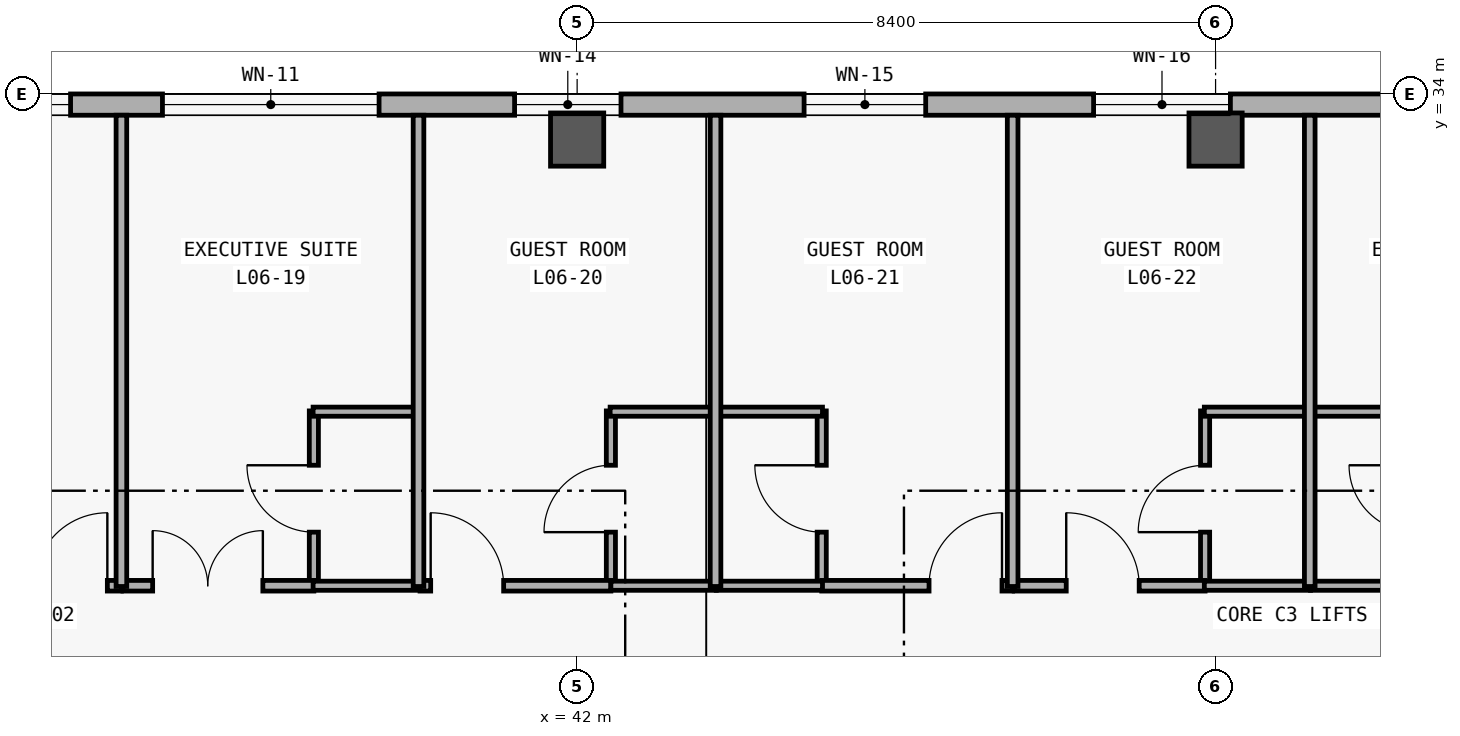
"""IFC4 building model, lengths in metres.
Left out: names, types, materials, properties, quantities, classifications, styles, units other than length and angle.
Written with IfcOpenShell. Run it as: python <this file> out.ifc"""

import sys

from ifc_helpers import new_model, si_unit, direction, frame, frame_2d, origin, origin_2d, place, context, subcontext, project, spatial, rectangle, extrude, element, fill, save


model = new_model("IFC4")
c1 = context("Model", 3, precision=1e-05, world=origin(), true_north=direction((0.0, 1.0)))
c2 = subcontext(c1, "Body", "Model", "MODEL_VIEW")
j1 = project(units=[si_unit("LENGTHUNIT", "METRE"), si_unit("PLANEANGLEUNIT", "RADIAN")], contexts=[c1])
p1 = place(None, origin())
s1 = spatial("IfcSite", under=j1, at=p1, CompositionType="ELEMENT")
p2 = place(p1, origin())
s2 = spatial("IfcBuilding", under=s1, at=p2, CompositionType="ELEMENT")
p3 = place(p2, frame((0.0, 0.0, 26.4)))
s3 = spatial("IfcBuildingStorey", under=s2, at=p3, CompositionType="ELEMENT", Elevation=26.4)
for number, where, z_axis, x_axis in (
    (1, (42.0, 33.4, 0.0), (0.0, 0.0, 1.0), (1.0, 0.0, 0.0)),
    (2, (50.4, 33.4, 0.0), (0.0, 0.0, 1.0), (1.0, 0.0, 0.0)),
):
    element("IfcColumn", number, at=place(p3, frame(where, z_axis=z_axis, x_axis=x_axis)), inside=s3, PredefinedType="COLUMN", context=c2, shape_type="SweptSolid", body=[
        extrude(rectangle(XDim=0.7, YDim=0.7, at=origin_2d()), origin(), (0.0, 0.0, 1.0), 3.6),
    ])
p4 = place(p3, frame((8.68, 33.86, 0.0), z_axis=(0.0, 0.0, 1.0), x_axis=(1.0, 0.0, 0.0)))
e3 = element("IfcWall", 3, at=p4, inside=s3, PredefinedType="SOLIDWALL", context=c2, shape_type="SweptSolid", body=[
    extrude(rectangle(XDim=66.64, YDim=0.28, at=frame_2d((33.32, 0.0))), origin(), (0.0, 0.0, 1.0), 3.32),
])
p5 = place(p4, frame((4.68, 0.0, 0.85)))
e4 = element("IfcOpeningElement", 4, at=p5, cuts=e3, PredefinedType="OPENING", context=c2, shape_type="SweptSolid", body=[
    extrude(rectangle(XDim=2.48, YDim=2.0, at=frame_2d((1.24, 1.0))), frame((0.0, 0.15, 0.0), z_axis=(0.0, -1.0, 0.0), x_axis=(1.0, 0.0, 0.0)), (0.0, 0.0, 1.0), 0.3),
])
p6 = place(p4, frame((12.829, 0.0, 0.85)))
e5 = element("IfcOpeningElement", 5, at=p6, cuts=e3, PredefinedType="OPENING", context=c2, shape_type="SweptSolid", body=[
    extrude(rectangle(XDim=1.65, YDim=1.75, at=frame_2d((0.825, 0.875))), frame((0.0, 0.15, 0.0), z_axis=(0.0, -1.0, 0.0), x_axis=(1.0, 0.0, 0.0)), (0.0, 0.0, 1.0), 0.3),
])
p7 = place(p4, frame((16.588, 0.0, 0.85)))
e6 = element("IfcOpeningElement", 6, at=p7, cuts=e3, PredefinedType="OPENING", context=c2, shape_type="SweptSolid", body=[
    extrude(rectangle(XDim=1.95, YDim=1.75, at=frame_2d((0.975, 0.875))), frame((0.0, 0.15, 0.0), z_axis=(0.0, -1.0, 0.0), x_axis=(1.0, 0.0, 0.0)), (0.0, 0.0, 1.0), 0.3),
])
p8 = place(p4, frame((20.347, 0.0, 0.85)))
e7 = element("IfcOpeningElement", 7, at=p8, cuts=e3, PredefinedType="OPENING", context=c2, shape_type="SweptSolid", body=[
    extrude(rectangle(XDim=2.25, YDim=1.75, at=frame_2d((1.125, 0.875))), frame((0.0, 0.15, 0.0), z_axis=(0.0, -1.0, 0.0), x_axis=(1.0, 0.0, 0.0)), (0.0, 0.0, 1.0), 0.3),
])
p9 = place(p4, frame((24.105, 0.0, 0.85)))
e8 = element("IfcOpeningElement", 8, at=p9, cuts=e3, PredefinedType="OPENING", context=c2, shape_type="SweptSolid", body=[
    extrude(rectangle(XDim=2.55, YDim=1.8, at=frame_2d((1.275, 0.9))), frame((0.0, 0.15, 0.0), z_axis=(0.0, -1.0, 0.0), x_axis=(1.0, 0.0, 0.0)), (0.0, 0.0, 1.0), 0.3),
])
p10 = place(p4, frame((27.864, 0.0, 0.85)))
e9 = element("IfcOpeningElement", 9, at=p10, cuts=e3, PredefinedType="OPENING", context=c2, shape_type="SweptSolid", body=[
    extrude(rectangle(XDim=2.85, YDim=1.85, at=frame_2d((1.425, 0.925))), frame((0.0, 0.15, 0.0), z_axis=(0.0, -1.0, 0.0), x_axis=(1.0, 0.0, 0.0)), (0.0, 0.0, 1.0), 0.3),
])
p11 = place(p4, frame((32.497, 0.0, 0.85)))
e10 = element("IfcOpeningElement", 10, at=p11, cuts=e3, PredefinedType="OPENING", context=c2, shape_type="SweptSolid", body=[
    extrude(rectangle(XDim=1.4, YDim=1.6, at=frame_2d((0.7, 0.8))), frame((0.0, 0.15, 0.0), z_axis=(0.0, -1.0, 0.0), x_axis=(1.0, 0.0, 0.0)), (0.0, 0.0, 1.0), 0.3),
])
p12 = place(p4, frame((36.306, 0.0, 0.85)))
e11 = element("IfcOpeningElement", 11, at=p12, cuts=e3, PredefinedType="OPENING", context=c2, shape_type="SweptSolid", body=[
    extrude(rectangle(XDim=1.6, YDim=1.6, at=frame_2d((0.8, 0.8))), frame((0.0, 0.15, 0.0), z_axis=(0.0, -1.0, 0.0), x_axis=(1.0, 0.0, 0.0)), (0.0, 0.0, 1.0), 0.3),
])
p13 = place(p4, frame((40.115, 0.0, 0.85)))
e12 = element("IfcOpeningElement", 12, at=p13, cuts=e3, PredefinedType="OPENING", context=c2, shape_type="SweptSolid", body=[
    extrude(rectangle(XDim=1.8, YDim=1.6, at=frame_2d((0.9, 0.8))), frame((0.0, 0.15, 0.0), z_axis=(0.0, -1.0, 0.0), x_axis=(1.0, 0.0, 0.0)), (0.0, 0.0, 1.0), 0.3),
])
p14 = place(p4, frame((43.923, 0.0, 0.85)))
e13 = element("IfcOpeningElement", 13, at=p14, cuts=e3, PredefinedType="OPENING", context=c2, shape_type="SweptSolid", body=[
    extrude(rectangle(XDim=2.0, YDim=1.65, at=frame_2d((1.0, 0.825))), frame((0.0, 0.15, 0.0), z_axis=(0.0, -1.0, 0.0), x_axis=(1.0, 0.0, 0.0)), (0.0, 0.0, 1.0), 0.3),
])
p15 = place(p4, frame((47.731, 0.0, 0.85)))
e14 = element("IfcOpeningElement", 14, at=p15, cuts=e3, PredefinedType="OPENING", context=c2, shape_type="SweptSolid", body=[
    extrude(rectangle(XDim=2.2, YDim=1.65, at=frame_2d((1.1, 0.825))), frame((0.0, 0.15, 0.0), z_axis=(0.0, -1.0, 0.0), x_axis=(1.0, 0.0, 0.0)), (0.0, 0.0, 1.0), 0.3),
])
p16 = place(p4, frame((51.44, 0.0, 0.85)))
e15 = element("IfcOpeningElement", 15, at=p16, cuts=e3, PredefinedType="OPENING", context=c2, shape_type="SweptSolid", body=[
    extrude(rectangle(XDim=2.6, YDim=2.2, at=frame_2d((1.3, 1.1))), frame((0.0, 0.15, 0.0), z_axis=(0.0, -1.0, 0.0), x_axis=(1.0, 0.0, 0.0)), (0.0, 0.0, 1.0), 0.3),
])
p17 = place(p4, frame((56.024, 0.0, 0.85)))
e16 = element("IfcOpeningElement", 16, at=p17, cuts=e3, PredefinedType="OPENING", context=c2, shape_type="SweptSolid", body=[
    extrude(rectangle(XDim=1.25, YDim=1.45, at=frame_2d((0.625, 0.725))), frame((0.0, 0.15, 0.0), z_axis=(0.0, -1.0, 0.0), x_axis=(1.0, 0.0, 0.0)), (0.0, 0.0, 1.0), 0.3),
])
p18 = place(p4, frame((59.882, 0.0, 0.85)))
e17 = element("IfcOpeningElement", 17, at=p18, cuts=e3, PredefinedType="OPENING", context=c2, shape_type="SweptSolid", body=[
    extrude(rectangle(XDim=1.35, YDim=1.55, at=frame_2d((0.675, 0.775))), frame((0.0, 0.15, 0.0), z_axis=(0.0, -1.0, 0.0), x_axis=(1.0, 0.0, 0.0)), (0.0, 0.0, 1.0), 0.3),
])
p19 = place(p4, frame((63.74, 0.0, 0.85)))
e18 = element("IfcOpeningElement", 18, at=p19, cuts=e3, PredefinedType="OPENING", context=c2, shape_type="SweptSolid", body=[
    extrude(rectangle(XDim=1.45, YDim=1.65, at=frame_2d((0.725, 0.825))), frame((0.0, 0.15, 0.0), z_axis=(0.0, -1.0, 0.0), x_axis=(1.0, 0.0, 0.0)), (0.0, 0.0, 1.0), 0.3),
])
p20 = place(p3, frame((38.536, 27.52, 0.0), z_axis=(0.0, 0.0, 1.0), x_axis=(0.0, 1.0, 0.0)))
e19 = element("IfcWall", 19, at=p20, inside=s3, PredefinedType="PARTITIONING", context=c2, shape_type="SweptSolid", body=[
    extrude(rectangle(XDim=2.31, YDim=0.12, at=frame_2d((1.155, 0.0))), origin(), (0.0, 0.0, 1.0), 2.48),
])
p21 = place(p20, frame((0.715, 0.0, 0.0)))
e20 = element("IfcOpeningElement", 20, at=p21, cuts=e19, PredefinedType="OPENING", context=c2, shape_type="SweptSolid", body=[
    extrude(rectangle(XDim=0.88, YDim=2.15, at=frame_2d((0.44, 1.075))), frame((0.0, 0.07, 0.0), z_axis=(0.0, -1.0, 0.0), x_axis=(1.0, 0.0, 0.0)), (0.0, 0.0, 1.0), 0.14),
])
p22 = place(p3, frame((42.444, 27.52, 0.0), z_axis=(0.0, 0.0, 1.0), x_axis=(0.0, 1.0, 0.0)))
e21 = element("IfcWall", 21, at=p22, inside=s3, PredefinedType="PARTITIONING", context=c2, shape_type="SweptSolid", body=[
    extrude(rectangle(XDim=2.31, YDim=0.12, at=frame_2d((1.155, 0.0))), origin(), (0.0, 0.0, 1.0), 2.48),
])
p23 = place(p22, frame((0.715, 0.0, 0.0)))
e22 = element("IfcOpeningElement", 22, at=p23, cuts=e21, PredefinedType="OPENING", context=c2, shape_type="SweptSolid", body=[
    extrude(rectangle(XDim=0.88, YDim=2.15, at=frame_2d((0.44, 1.075))), frame((0.0, 0.07, 0.0), z_axis=(0.0, -1.0, 0.0), x_axis=(1.0, 0.0, 0.0)), (0.0, 0.0, 1.0), 0.14),
])
p24 = place(p3, frame((45.218, 27.52, 0.0), z_axis=(0.0, 0.0, 1.0), x_axis=(0.0, 1.0, 0.0)))
e23 = element("IfcWall", 23, at=p24, inside=s3, PredefinedType="PARTITIONING", context=c2, shape_type="SweptSolid", body=[
    extrude(rectangle(XDim=2.31, YDim=0.12, at=frame_2d((1.155, 0.0))), origin(), (0.0, 0.0, 1.0), 2.48),
])
p25 = place(p24, frame((0.715, 0.0, 0.0)))
e24 = element("IfcOpeningElement", 24, at=p25, cuts=e23, PredefinedType="OPENING", context=c2, shape_type="SweptSolid", body=[
    extrude(rectangle(XDim=0.88, YDim=2.15, at=frame_2d((0.44, 1.075))), frame((0.0, 0.07, 0.0), z_axis=(0.0, -1.0, 0.0), x_axis=(1.0, 0.0, 0.0)), (0.0, 0.0, 1.0), 0.14),
])
p26 = place(p3, frame((50.262, 27.52, 0.0), z_axis=(0.0, 0.0, 1.0), x_axis=(0.0, 1.0, 0.0)))
e25 = element("IfcWall", 25, at=p26, inside=s3, PredefinedType="PARTITIONING", context=c2, shape_type="SweptSolid", body=[
    extrude(rectangle(XDim=2.31, YDim=0.12, at=frame_2d((1.155, 0.0))), origin(), (0.0, 0.0, 1.0), 2.48),
])
p27 = place(p26, frame((0.715, 0.0, 0.0)))
e26 = element("IfcOpeningElement", 26, at=p27, cuts=e25, PredefinedType="OPENING", context=c2, shape_type="SweptSolid", body=[
    extrude(rectangle(XDim=0.88, YDim=2.15, at=frame_2d((0.44, 1.075))), frame((0.0, 0.07, 0.0), z_axis=(0.0, -1.0, 0.0), x_axis=(1.0, 0.0, 0.0)), (0.0, 0.0, 1.0), 0.14),
])
p28 = place(p3, frame((33.493, 27.53, 0.0), z_axis=(0.0, 0.0, 1.0), x_axis=(1.0, 0.0, 0.0)))
e27 = element("IfcWall", 27, at=p28, inside=s3, PredefinedType="PARTITIONING", context=c2, shape_type="SweptSolid", body=[
    extrude(rectangle(XDim=2.511, YDim=0.14, at=frame_2d((1.255, 0.0))), origin(), (0.0, 0.0, 1.0), 2.48),
])
p29 = place(p28, frame((1.366, 0.0, 0.0)))
e28 = element("IfcOpeningElement", 28, at=p29, cuts=e27, PredefinedType="OPENING", context=c2, shape_type="SweptSolid", body=[
    extrude(rectangle(XDim=0.96, YDim=2.25, at=frame_2d((0.48, 1.125))), frame((0.0, 0.08, 0.0), z_axis=(0.0, -1.0, 0.0), x_axis=(1.0, 0.0, 0.0)), (0.0, 0.0, 1.0), 0.16),
])
p30 = place(p3, frame((36.024, 27.53, 0.0), z_axis=(0.0, 0.0, 1.0), x_axis=(1.0, 0.0, 0.0)))
e29 = element("IfcWall", 29, at=p30, inside=s3, PredefinedType="PARTITIONING", context=c2, shape_type="SweptSolid", body=[
    extrude(rectangle(XDim=2.512, YDim=0.14, at=frame_2d((1.256, 0.0))), origin(), (0.0, 0.0, 1.0), 2.48),
])
p31 = place(p30, frame((0.391, 0.0, 0.0)))
e30 = element("IfcOpeningElement", 30, at=p31, cuts=e29, PredefinedType="OPENING", context=c2, shape_type="SweptSolid", body=[
    extrude(rectangle(XDim=1.45, YDim=2.3, at=frame_2d((0.725, 1.15))), frame((0.0, 0.08, 0.0), z_axis=(0.0, -1.0, 0.0), x_axis=(1.0, 0.0, 0.0)), (0.0, 0.0, 1.0), 0.16),
])
p32 = place(p3, frame((39.933, 27.53, 0.0), z_axis=(0.0, 0.0, 1.0), x_axis=(1.0, 0.0, 0.0)))
e31 = element("IfcWall", 31, at=p32, inside=s3, PredefinedType="PARTITIONING", context=c2, shape_type="SweptSolid", body=[
    extrude(rectangle(XDim=2.511, YDim=0.14, at=frame_2d((1.255, 0.0))), origin(), (0.0, 0.0, 1.0), 2.48),
])
p33 = place(p32, frame((0.14, 0.0, 0.0)))
e32 = element("IfcOpeningElement", 32, at=p33, cuts=e31, PredefinedType="OPENING", context=c2, shape_type="SweptSolid", body=[
    extrude(rectangle(XDim=0.96, YDim=2.25, at=frame_2d((0.48, 1.125))), frame((0.0, 0.08, 0.0), z_axis=(0.0, -1.0, 0.0), x_axis=(1.0, 0.0, 0.0)), (0.0, 0.0, 1.0), 0.16),
])
p34 = place(p3, frame((45.218, 27.53, 0.0), z_axis=(0.0, 0.0, 1.0), x_axis=(1.0, 0.0, 0.0)))
e33 = element("IfcWall", 33, at=p34, inside=s3, PredefinedType="PARTITIONING", context=c2, shape_type="SweptSolid", body=[
    extrude(rectangle(XDim=2.512, YDim=0.14, at=frame_2d((1.256, 0.0))), origin(), (0.0, 0.0, 1.0), 2.48),
])
p35 = place(p34, frame((1.412, 0.0, 0.0)))
e34 = element("IfcOpeningElement", 34, at=p35, cuts=e33, PredefinedType="OPENING", context=c2, shape_type="SweptSolid", body=[
    extrude(rectangle(XDim=0.96, YDim=2.25, at=frame_2d((0.48, 1.125))), frame((0.0, 0.08, 0.0), z_axis=(0.0, -1.0, 0.0), x_axis=(1.0, 0.0, 0.0)), (0.0, 0.0, 1.0), 0.16),
])
p36 = place(p3, frame((47.75, 27.53, 0.0), z_axis=(0.0, 0.0, 1.0), x_axis=(1.0, 0.0, 0.0)))
e35 = element("IfcWall", 35, at=p36, inside=s3, PredefinedType="PARTITIONING", context=c2, shape_type="SweptSolid", body=[
    extrude(rectangle(XDim=2.512, YDim=0.14, at=frame_2d((1.256, 0.0))), origin(), (0.0, 0.0, 1.0), 2.48),
])
p37 = place(p36, frame((0.685, 0.0, 0.0)))
e36 = element("IfcOpeningElement", 36, at=p37, cuts=e35, PredefinedType="OPENING", context=c2, shape_type="SweptSolid", body=[
    extrude(rectangle(XDim=0.96, YDim=2.25, at=frame_2d((0.48, 1.125))), frame((0.0, 0.08, 0.0), z_axis=(0.0, -1.0, 0.0), x_axis=(1.0, 0.0, 0.0)), (0.0, 0.0, 1.0), 0.16),
])
for number, where, z_axis, x_axis in (
    (37, (38.526, 27.53, 0.0), (0.0, 0.0, 1.0), (1.0, 0.0, 0.0)),
    (38, (38.526, 29.82, 0.0), (0.0, 0.0, 1.0), (1.0, 0.0, 0.0)),
):
    element("IfcWall", number, at=place(p3, frame(where, z_axis=z_axis, x_axis=x_axis)), inside=s3, PredefinedType="PARTITIONING", context=c2, shape_type="SweptSolid", body=[
        extrude(rectangle(XDim=1.397, YDim=0.12, at=frame_2d((0.699, 0.0))), origin(), (0.0, 0.0, 1.0), 2.48),
    ])
p38 = place(p3, frame((42.444, 27.53, 0.0), z_axis=(0.0, 0.0, 1.0), x_axis=(1.0, 0.0, 0.0)))
e39 = element("IfcWall", 39, at=p38, inside=s3, PredefinedType="PARTITIONING", context=c2, shape_type="SweptSolid", body=[
    extrude(rectangle(XDim=1.387, YDim=0.12, at=frame_2d((0.693, 0.0))), origin(), (0.0, 0.0, 1.0), 2.48),
])
for number, where, z_axis, x_axis in (
    (40, (42.434, 29.82, 0.0), (0.0, 0.0, 1.0), (1.0, 0.0, 0.0)),
    (41, (43.831, 27.53, 0.0), (0.0, 0.0, 1.0), (1.0, 0.0, 0.0)),
    (42, (43.831, 29.82, 0.0), (0.0, 0.0, 1.0), (1.0, 0.0, 0.0)),
    (43, (50.252, 27.53, 0.0), (0.0, 0.0, 1.0), (1.0, 0.0, 0.0)),
    (44, (50.252, 29.82, 0.0), (0.0, 0.0, 1.0), (1.0, 0.0, 0.0)),
    (45, (51.649, 27.53, 0.0), (0.0, 0.0, 1.0), (1.0, 0.0, 0.0)),
    (46, (51.649, 29.82, 0.0), (0.0, 0.0, 1.0), (1.0, 0.0, 0.0)),
):
    element("IfcWall", number, at=place(p3, frame(where, z_axis=z_axis, x_axis=x_axis)), inside=s3, PredefinedType="PARTITIONING", context=c2, shape_type="SweptSolid", body=[
        extrude(rectangle(XDim=1.397, YDim=0.12, at=frame_2d((0.698, 0.0))), origin(), (0.0, 0.0, 1.0), 2.48),
    ])
for number, where, z_axis, x_axis in (
    (47, (36.004, 27.52, 0.0), (0.0, 0.0, 1.0), (0.0, 1.0, 0.0)),
    (48, (39.913, 27.52, 0.0), (0.0, 0.0, 1.0), (0.0, 1.0, 0.0)),
    (49, (43.821, 27.52, 0.0), (0.0, 0.0, 1.0), (0.0, 1.0, 0.0)),
    (50, (47.73, 27.52, 0.0), (0.0, 0.0, 1.0), (0.0, 1.0, 0.0)),
    (51, (51.639, 27.52, 0.0), (0.0, 0.0, 1.0), (0.0, 1.0, 0.0)),
):
    element("IfcWall", number, at=place(p3, frame(where, z_axis=z_axis, x_axis=x_axis)), inside=s3, PredefinedType="PARTITIONING", context=c2, shape_type="SweptSolid", body=[
        extrude(rectangle(XDim=6.2, YDim=0.14, at=frame_2d((3.1, 0.0))), origin(), (0.0, 0.0, 1.0), 2.48),
    ])
p39 = place(p9, origin())
e52 = element("IfcWindow", 52, at=p39, inside=s3, PartitioningType="SINGLE_PANEL", PredefinedType="WINDOW", context=c2, shape_type="SweptSolid", body=[
    extrude(rectangle(XDim=2.55, YDim=1.8, at=frame_2d((1.275, 0.9))), frame((0.0, 0.03, 0.0), z_axis=(0.0, -1.0, 0.0), x_axis=(1.0, 0.0, 0.0)), (0.0, 0.0, 1.0), 0.06),
])
fill(e8, e52)
p40 = place(p10, origin())
e53 = element("IfcWindow", 53, at=p40, inside=s3, PartitioningType="SINGLE_PANEL", PredefinedType="WINDOW", context=c2, shape_type="SweptSolid", body=[
    extrude(rectangle(XDim=2.85, YDim=1.85, at=frame_2d((1.425, 0.925))), frame((0.0, 0.03, 0.0), z_axis=(0.0, -1.0, 0.0), x_axis=(1.0, 0.0, 0.0)), (0.0, 0.0, 1.0), 0.06),
])
fill(e9, e53)
p41 = place(p11, origin())
e54 = element("IfcWindow", 54, at=p41, inside=s3, PartitioningType="SINGLE_PANEL", PredefinedType="WINDOW", context=c2, shape_type="SweptSolid", body=[
    extrude(rectangle(XDim=1.4, YDim=1.6, at=frame_2d((0.7, 0.8))), frame((0.0, 0.03, 0.0), z_axis=(0.0, -1.0, 0.0), x_axis=(1.0, 0.0, 0.0)), (0.0, 0.0, 1.0), 0.06),
])
fill(e10, e54)
p42 = place(p12, origin())
e55 = element("IfcWindow", 55, at=p42, inside=s3, PartitioningType="SINGLE_PANEL", PredefinedType="WINDOW", context=c2, shape_type="SweptSolid", body=[
    extrude(rectangle(XDim=1.6, YDim=1.6, at=frame_2d((0.8, 0.8))), frame((0.0, 0.03, 0.0), z_axis=(0.0, -1.0, 0.0), x_axis=(1.0, 0.0, 0.0)), (0.0, 0.0, 1.0), 0.06),
])
fill(e11, e55)
p43 = place(p13, origin())
e56 = element("IfcWindow", 56, at=p43, inside=s3, PartitioningType="SINGLE_PANEL", PredefinedType="WINDOW", context=c2, shape_type="SweptSolid", body=[
    extrude(rectangle(XDim=1.8, YDim=1.6, at=frame_2d((0.9, 0.8))), frame((0.0, 0.03, 0.0), z_axis=(0.0, -1.0, 0.0), x_axis=(1.0, 0.0, 0.0)), (0.0, 0.0, 1.0), 0.06),
])
fill(e12, e56)
p44 = place(p21, origin())
e57 = element("IfcDoor", 57, at=p44, inside=s3, OperationType="SINGLE_SWING_RIGHT", PredefinedType="DOOR", context=c2, shape_type="SweptSolid", body=[
    extrude(rectangle(XDim=0.88, YDim=2.15, at=frame_2d((0.44, 1.075))), frame((0.0, 0.025, 0.0), z_axis=(0.0, -1.0, 0.0), x_axis=(1.0, 0.0, 0.0)), (0.0, 0.0, 1.0), 0.05),
])
fill(e20, e57)
p45 = place(p23, origin())
e58 = element("IfcDoor", 58, at=p45, inside=s3, OperationType="SINGLE_SWING_LEFT", PredefinedType="DOOR", context=c2, shape_type="SweptSolid", body=[
    extrude(rectangle(XDim=0.88, YDim=2.15, at=frame_2d((0.44, 1.075))), frame((0.0, 0.025, 0.0), z_axis=(0.0, -1.0, 0.0), x_axis=(1.0, 0.0, 0.0)), (0.0, 0.0, 1.0), 0.05),
])
fill(e22, e58)
p46 = place(p25, origin())
e59 = element("IfcDoor", 59, at=p46, inside=s3, OperationType="SINGLE_SWING_RIGHT", PredefinedType="DOOR", context=c2, shape_type="SweptSolid", body=[
    extrude(rectangle(XDim=0.88, YDim=2.15, at=frame_2d((0.44, 1.075))), frame((0.0, 0.025, 0.0), z_axis=(0.0, -1.0, 0.0), x_axis=(1.0, 0.0, 0.0)), (0.0, 0.0, 1.0), 0.05),
])
fill(e24, e59)
p47 = place(p27, origin())
e60 = element("IfcDoor", 60, at=p47, inside=s3, OperationType="SINGLE_SWING_LEFT", PredefinedType="DOOR", context=c2, shape_type="SweptSolid", body=[
    extrude(rectangle(XDim=0.88, YDim=2.15, at=frame_2d((0.44, 1.075))), frame((0.0, 0.025, 0.0), z_axis=(0.0, -1.0, 0.0), x_axis=(1.0, 0.0, 0.0)), (0.0, 0.0, 1.0), 0.05),
])
fill(e26, e60)
p48 = place(p29, origin())
e61 = element("IfcDoor", 61, at=p48, inside=s3, OperationType="SINGLE_SWING_RIGHT", PredefinedType="DOOR", context=c2, shape_type="SweptSolid", body=[
    extrude(rectangle(XDim=0.96, YDim=2.25, at=frame_2d((0.48, 1.125))), frame((0.0, 0.025, 0.0), z_axis=(0.0, -1.0, 0.0), x_axis=(1.0, 0.0, 0.0)), (0.0, 0.0, 1.0), 0.05),
])
fill(e28, e61)
p49 = place(p31, origin())
e62 = element("IfcDoor", 62, at=p49, inside=s3, OperationType="DOUBLE_DOOR_SINGLE_SWING", PredefinedType="DOOR", context=c2, shape_type="SweptSolid", body=[
    extrude(rectangle(XDim=1.45, YDim=2.3, at=frame_2d((0.725, 1.15))), frame((0.0, 0.025, 0.0), z_axis=(0.0, -1.0, 0.0), x_axis=(1.0, 0.0, 0.0)), (0.0, 0.0, 1.0), 0.05),
])
fill(e30, e62)
p50 = place(p33, origin())
e63 = element("IfcDoor", 63, at=p50, inside=s3, OperationType="SINGLE_SWING_LEFT", PredefinedType="DOOR", context=c2, shape_type="SweptSolid", body=[
    extrude(rectangle(XDim=0.96, YDim=2.25, at=frame_2d((0.48, 1.125))), frame((0.0, 0.025, 0.0), z_axis=(0.0, -1.0, 0.0), x_axis=(1.0, 0.0, 0.0)), (0.0, 0.0, 1.0), 0.05),
])
fill(e32, e63)
p51 = place(p35, origin())
e64 = element("IfcDoor", 64, at=p51, inside=s3, OperationType="SINGLE_SWING_RIGHT", PredefinedType="DOOR", context=c2, shape_type="SweptSolid", body=[
    extrude(rectangle(XDim=0.96, YDim=2.25, at=frame_2d((0.48, 1.125))), frame((0.0, 0.025, 0.0), z_axis=(0.0, -1.0, 0.0), x_axis=(1.0, 0.0, 0.0)), (0.0, 0.0, 1.0), 0.05),
])
fill(e34, e64)
p52 = place(p37, origin())
e65 = element("IfcDoor", 65, at=p52, inside=s3, OperationType="SINGLE_SWING_LEFT", PredefinedType="DOOR", context=c2, shape_type="SweptSolid", body=[
    extrude(rectangle(XDim=0.96, YDim=2.25, at=frame_2d((0.48, 1.125))), frame((0.0, 0.025, 0.0), z_axis=(0.0, -1.0, 0.0), x_axis=(1.0, 0.0, 0.0)), (0.0, 0.0, 1.0), 0.05),
])
fill(e36, e65)
save(model, sys.argv[1])
